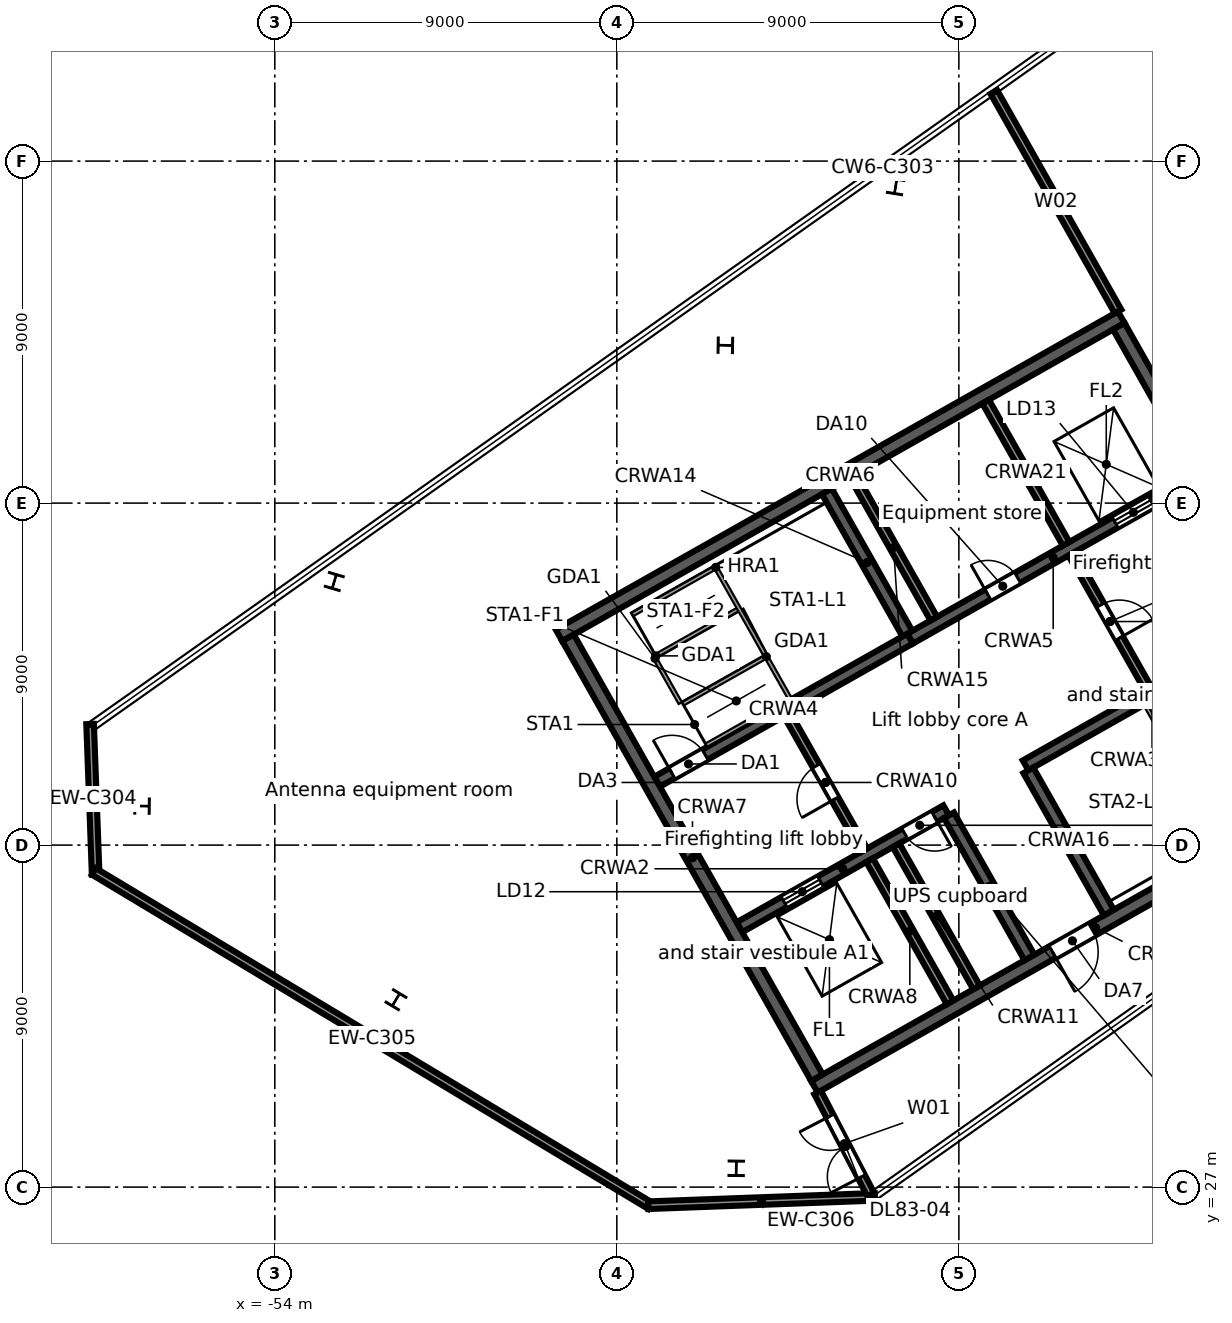
"""IFC4 building model, lengths in metres.
Left out: names, types, materials, properties, quantities, classifications, styles, units other than length and angle.
Written with IfcOpenShell. Run it as: python <this file> out.ifc"""

import sys

from ifc_helpers import new_model, si_unit, direction, frame, frame_2d, origin, origin_2d, place, context, subcontext, project, spatial, rectangle, i_section, extrude, element, fill, save


model = new_model("IFC4")
c1 = context("Model", 3, precision=1e-05, world=origin(), true_north=direction((0.0, 1.0)))
c2 = subcontext(c1, "Body", "Model", "MODEL_VIEW")
j1 = project(units=[si_unit("LENGTHUNIT", "METRE"), si_unit("PLANEANGLEUNIT", "RADIAN")], contexts=[c1])
p1 = place(None, origin())
s1 = spatial("IfcSite", under=j1, at=p1, CompositionType="ELEMENT")
p2 = place(p1, origin())
s2 = spatial("IfcBuilding", under=s1, at=p2, CompositionType="ELEMENT")
p3 = place(p2, frame((0.0, 0.0, 364.9)))
s3 = spatial("IfcBuildingStorey", under=s2, at=p3, CompositionType="ELEMENT", Elevation=364.9)
for number, where, z_axis, x_axis in (
    (1, (-57.493, 37.027, 0.0), (0.0, 0.0, 1.0), (-0.013, -1.0, 0.0)),
    (2, (-50.812, 31.931, 0.0), (0.0, 0.0, 1.0), (0.857, -0.515, 0.0)),
    (3, (-41.858, 27.495, 0.0), (0.0, 0.0, 1.0), (1.0, -0.013, 0.0)),
    (4, (-42.144, 49.153, 0.0), (0.0, 0.0, 1.0), (0.018, 1.0, 0.0)),
    (5, (-37.664, 53.334, 0.0), (0.0, 0.0, 1.0), (-0.987, 0.158, 0.0)),
    (6, (-52.435, 42.936, 0.0), (0.0, 0.0, 1.0), (-0.959, 0.283, 0.0)),
):
    element("IfcColumn", number, at=place(p3, frame(where, z_axis=z_axis, x_axis=x_axis)), inside=s3, PredefinedType="COLUMN", context=c2, shape_type="SweptSolid", body=[
        extrude(i_section(OverallWidth=0.4, OverallDepth=0.4, WebThickness=0.013, FlangeThickness=0.021, FilletRadius=0.022, at=origin_2d()), origin(), (0.0, 0.0, 1.0), 3.6),
    ])
p4 = place(p3, frame((-58.714, 35.226, 0.0), z_axis=(0.0, 0.0, 1.0), x_axis=(-0.036847570404, 0.999320897688, 0.0)))
e7 = element("IfcWall", 7, at=p4, inside=s3, PredefinedType="STANDARD", context=c2, shape_type="SweptSolid", body=[
    extrude(rectangle(XDim=3.962, YDim=0.2, at=frame_2d((1.981, 0.0))), origin(), (0.0, 0.0, 1.0), 3.3),
])
p5 = place(p3, frame((-44.119, 26.509, 0.0), z_axis=(0.0, 0.0, 1.0), x_axis=(-0.857168693653, 0.515035756644, 0.0)))
e8 = element("IfcWall", 8, at=p5, inside=s3, PredefinedType="STANDARD", context=c2, shape_type="SweptSolid", body=[
    extrude(rectangle(XDim=17.084, YDim=0.2, at=frame_2d((8.542, 0.0))), origin(), (0.0, 0.0, 1.0), 3.3),
])
p6 = place(p3, frame((-38.21, 26.744, 0.0), z_axis=(0.0, 0.0, 1.0), x_axis=(-0.999319030106, -0.036898185155, 0.0)))
e9 = element("IfcWall", 9, at=p6, inside=s3, PredefinedType="STANDARD", context=c2, shape_type="SweptSolid", body=[
    extrude(rectangle(XDim=5.968, YDim=0.2, at=frame_2d((2.984, 0.0))), origin(), (0.0, 0.0, 1.0), 3.3),
])
p7 = place(p3, frame((-39.801, 29.64, 0.0), z_axis=(0.0, 0.0, 1.0), x_axis=(0.870359753402, 0.492416388494, 0.0)))
e10 = element("IfcWall", 10, at=p7, inside=s3, PredefinedType="SOLIDWALL", context=c2, shape_type="SweptSolid", body=[
    extrude(rectangle(XDim=17.0, YDim=0.35, at=frame_2d((8.5, 0.0))), origin(), (0.0, 0.0, 1.0), 3.3),
])
p8 = place(p7, frame((7.2, 0.0, 0.0)))
e11 = element("IfcOpeningElement", 11, at=p8, cuts=e10, PredefinedType="OPENING", context=c2, shape_type="SweptSolid", body=[
    extrude(rectangle(XDim=1.2, YDim=2.1, at=frame_2d((0.6, 1.05))), frame((0.0, 0.185, 0.0), z_axis=(0.0, -1.0, 0.0), x_axis=(1.0, 0.0, 0.0)), (0.0, 0.0, 1.0), 0.37),
])
p9 = place(p3, frame((-41.774, 33.838, 0.0), z_axis=(0.0, 0.0, 1.0), x_axis=(0.870355415866, 0.492424055132, 0.0)))
e12 = element("IfcWall", 12, at=p9, inside=s3, PredefinedType="SOLIDWALL", context=c2, shape_type="SweptSolid", body=[
    extrude(rectangle(XDim=6.25, YDim=0.3, at=frame_2d((3.125, 0.0))), origin(), (0.0, 0.0, 1.0), 3.3),
])
p10 = place(p9, frame((1.35, 0.0, 0.0)))
e13 = element("IfcOpeningElement", 13, at=p10, cuts=e12, PredefinedType="OPENING", context=c2, shape_type="SweptSolid", body=[
    extrude(rectangle(XDim=1.1, YDim=2.1, at=frame_2d((0.55, 1.05))), frame((0.0, 0.16, 0.0), z_axis=(0.0, -1.0, 0.0), x_axis=(1.0, 0.0, 0.0)), (0.0, 0.0, 1.0), 0.32),
])
p11 = place(p9, frame((5.0, 0.0, 0.0)))
e14 = element("IfcOpeningElement", 14, at=p11, cuts=e12, PredefinedType="OPENING", context=c2, shape_type="SweptSolid", body=[
    extrude(rectangle(XDim=0.9, YDim=2.1, at=frame_2d((0.45, 1.05))), frame((0.0, 0.16, 0.0), z_axis=(0.0, -1.0, 0.0), x_axis=(1.0, 0.0, 0.0)), (0.0, 0.0, 1.0), 0.32),
])
p12 = place(p3, frame((-34.245, 38.097, 0.0), z_axis=(0.0, 0.0, 1.0), x_axis=(0.870352347706, 0.49242947804, 0.0)))
e15 = element("IfcWall", 15, at=p12, inside=s3, PredefinedType="SOLIDWALL", context=c2, shape_type="SweptSolid", body=[
    extrude(rectangle(XDim=7.65, YDim=0.3, at=frame_2d((3.825, 0.0))), origin(), (0.0, 0.0, 1.0), 3.3),
])
p13 = place(p12, frame((6.2, 0.0, 0.0)))
e16 = element("IfcOpeningElement", 16, at=p13, cuts=e15, PredefinedType="OPENING", context=c2, shape_type="SweptSolid", body=[
    extrude(rectangle(XDim=1.0, YDim=2.1, at=frame_2d((0.5, 1.05))), frame((0.0, 0.16, 0.0), z_axis=(0.0, -1.0, 0.0), x_axis=(1.0, 0.0, 0.0)), (0.0, 0.0, 1.0), 0.32),
])
p14 = place(p3, frame((-43.94, 37.667, 0.0), z_axis=(0.0, 0.0, 1.0), x_axis=(0.870352347706, 0.49242947804, 0.0)))
e17 = element("IfcWall", 17, at=p14, inside=s3, PredefinedType="SOLIDWALL", context=c2, shape_type="SweptSolid", body=[
    extrude(rectangle(XDim=7.65, YDim=0.3, at=frame_2d((3.825, 0.0))), origin(), (0.0, 0.0, 1.0), 3.3),
])
p15 = place(p14, frame((0.45, 0.0, 0.0)))
e18 = element("IfcOpeningElement", 18, at=p15, cuts=e17, PredefinedType="OPENING", context=c2, shape_type="SweptSolid", body=[
    extrude(rectangle(XDim=1.0, YDim=2.1, at=frame_2d((0.5, 1.05))), frame((0.0, 0.16, 0.0), z_axis=(0.0, -1.0, 0.0), x_axis=(1.0, 0.0, 0.0)), (0.0, 0.0, 1.0), 0.32),
])
p16 = place(p3, frame((-37.282, 41.435, 0.0), z_axis=(0.0, 0.0, 1.0), x_axis=(0.870364588774, 0.492407841741, 0.0)))
e19 = element("IfcWall", 19, at=p16, inside=s3, PredefinedType="SOLIDWALL", context=c2, shape_type="SweptSolid", body=[
    extrude(rectangle(XDim=8.65, YDim=0.3, at=frame_2d((4.325, 0.0))), origin(), (0.0, 0.0, 1.0), 3.3),
])
p17 = place(p16, frame((6.2, 0.0, 0.0)))
e20 = element("IfcOpeningElement", 20, at=p17, cuts=e19, PredefinedType="OPENING", context=c2, shape_type="SweptSolid", body=[
    extrude(rectangle(XDim=1.1, YDim=2.1, at=frame_2d((0.55, 1.05))), frame((0.0, 0.16, 0.0), z_axis=(0.0, -1.0, 0.0), x_axis=(1.0, 0.0, 0.0)), (0.0, 0.0, 1.0), 0.32),
])
p18 = place(p16, frame((2.35, 0.0, 0.0)))
e21 = element("IfcOpeningElement", 21, at=p18, cuts=e19, PredefinedType="OPENING", context=c2, shape_type="SweptSolid", body=[
    extrude(rectangle(XDim=0.9, YDim=2.1, at=frame_2d((0.45, 1.05))), frame((0.0, 0.16, 0.0), z_axis=(0.0, -1.0, 0.0), x_axis=(1.0, 0.0, 0.0)), (0.0, 0.0, 1.0), 0.32),
])
p19 = place(p3, frame((-46.522, 41.521, 0.0), z_axis=(0.0, 0.0, 1.0), x_axis=(0.870359753402, 0.492416388494, 0.0)))
e22 = element("IfcWall", 22, at=p19, inside=s3, PredefinedType="SOLIDWALL", context=c2, shape_type="SweptSolid", body=[
    extrude(rectangle(XDim=17.0, YDim=0.35, at=frame_2d((8.5, 0.0))), origin(), (0.0, 0.0, 1.0), 3.3),
])
p20 = place(p3, frame((-46.284, 41.454, 0.0), z_axis=(0.0, 0.0, 1.0), x_axis=(0.492429810477, -0.870352159619, 0.0)))
e23 = element("IfcWall", 23, at=p20, inside=s3, PredefinedType="SOLIDWALL", context=c2, shape_type="SweptSolid", body=[
    extrude(rectangle(XDim=13.3, YDim=0.35, at=frame_2d((6.65, 0.0))), origin(), (0.0, 0.0, 1.0), 3.3),
])
p21 = place(p3, frame((-38.349, 35.603, 0.0), z_axis=(0.0, 0.0, 1.0), x_axis=(0.492410799949, -0.870362915164, 0.0)))
e24 = element("IfcWall", 24, at=p21, inside=s3, PredefinedType="SOLIDWALL", context=c2, shape_type="SweptSolid", body=[
    extrude(rectangle(XDim=4.3, YDim=0.2, at=frame_2d((2.15, 0.0))), origin(), (0.0, 0.0, 1.0), 3.3),
])
p22 = place(p3, frame((-40.516, 39.433, 0.0), z_axis=(0.0, 0.0, 1.0), x_axis=(0.492453559952, -0.87033872216, 0.0)))
e25 = element("IfcWall", 25, at=p22, inside=s3, PredefinedType="PARTITIONING", context=c2, shape_type="SweptSolid", body=[
    extrude(rectangle(XDim=4.1, YDim=0.2, at=frame_2d((2.05, 0.0))), origin(), (0.0, 0.0, 1.0), 3.3),
])
p23 = place(p22, frame((1.55, 0.0, 0.0)))
e26 = element("IfcOpeningElement", 26, at=p23, cuts=e25, PredefinedType="OPENING", context=c2, shape_type="SweptSolid", body=[
    extrude(rectangle(XDim=1.0, YDim=2.1, at=frame_2d((0.5, 1.05))), frame((0.0, 0.11, 0.0), z_axis=(0.0, -1.0, 0.0), x_axis=(1.0, 0.0, 0.0)), (0.0, 0.0, 1.0), 0.22),
])
p24 = place(p3, frame((-37.653, 35.997, 0.0), z_axis=(0.0, 0.0, 1.0), x_axis=(0.492435133428, -0.870349147967, 0.0)))
e27 = element("IfcWall", 27, at=p24, inside=s3, PredefinedType="SOLIDWALL", context=c2, shape_type="SweptSolid", body=[
    extrude(rectangle(XDim=4.3, YDim=0.2, at=frame_2d((2.15, 0.0))), origin(), (0.0, 0.0, 1.0), 3.3),
])
p25 = place(p3, frame((-36.26, 36.785, 0.0), z_axis=(0.0, 0.0, 1.0), x_axis=(0.492435133428, -0.870349147967, 0.0)))
e28 = element("IfcWall", 28, at=p25, inside=s3, PredefinedType="SOLIDWALL", context=c2, shape_type="SweptSolid", body=[
    extrude(rectangle(XDim=4.3, YDim=0.3, at=frame_2d((2.15, 0.0))), origin(), (0.0, 0.0, 1.0), 3.3),
])
p26 = place(p3, frame((-39.473, 45.308, 0.0), z_axis=(0.0, 0.0, 1.0), x_axis=(0.492410799949, -0.870362915164, 0.0)))
e29 = element("IfcWall", 29, at=p26, inside=s3, PredefinedType="SOLIDWALL", context=c2, shape_type="SweptSolid", body=[
    extrude(rectangle(XDim=4.3, YDim=0.3, at=frame_2d((2.15, 0.0))), origin(), (0.0, 0.0, 1.0), 3.3),
])
p27 = place(p3, frame((-38.777, 45.701, 0.0), z_axis=(0.0, 0.0, 1.0), x_axis=(0.492435133428, -0.870349147967, 0.0)))
e30 = element("IfcWall", 30, at=p27, inside=s3, PredefinedType="SOLIDWALL", context=c2, shape_type="SweptSolid", body=[
    extrude(rectangle(XDim=4.3, YDim=0.2, at=frame_2d((2.15, 0.0))), origin(), (0.0, 0.0, 1.0), 3.3),
])
p28 = place(p3, frame((-34.171, 37.967, 0.0), z_axis=(0.0, 0.0, 1.0), x_axis=(0.492435133428, -0.870349147967, 0.0)))
e31 = element("IfcWall", 31, at=p28, inside=s3, PredefinedType="SOLIDWALL", context=c2, shape_type="SweptSolid", body=[
    extrude(rectangle(XDim=4.3, YDim=0.3, at=frame_2d((2.15, 0.0))), origin(), (0.0, 0.0, 1.0), 3.3),
])
p29 = place(p3, frame((-33.031, 43.667, 0.0), z_axis=(0.0, 0.0, 1.0), x_axis=(0.492408451753, -0.87036424366, 0.0)))
e32 = element("IfcWall", 32, at=p29, inside=s3, PredefinedType="PARTITIONING", context=c2, shape_type="SweptSolid", body=[
    extrude(rectangle(XDim=4.1, YDim=0.2, at=frame_2d((2.05, 0.0))), origin(), (0.0, 0.0, 1.0), 3.3),
])
p30 = place(p29, frame((1.55, 0.0, 0.0)))
e33 = element("IfcOpeningElement", 33, at=p30, cuts=e32, PredefinedType="OPENING", context=c2, shape_type="SweptSolid", body=[
    extrude(rectangle(XDim=1.0, YDim=2.1, at=frame_2d((0.5, 1.05))), frame((0.0, 0.11, 0.0), z_axis=(0.0, -1.0, 0.0), x_axis=(1.0, 0.0, 0.0)), (0.0, 0.0, 1.0), 0.22),
])
p31 = place(p3, frame((-35.296, 47.671, 0.0), z_axis=(0.0, 0.0, 1.0), x_axis=(0.492435133428, -0.870349147967, 0.0)))
e34 = element("IfcWall", 34, at=p31, inside=s3, PredefinedType="SOLIDWALL", context=c2, shape_type="SweptSolid", body=[
    extrude(rectangle(XDim=4.3, YDim=0.2, at=frame_2d((2.15, 0.0))), origin(), (0.0, 0.0, 1.0), 3.3),
])
p32 = place(p3, frame((-31.792, 49.653, 0.0), z_axis=(0.0, 0.0, 1.0), x_axis=(0.492421943245, -0.870356610712, 0.0)))
e35 = element("IfcWall", 35, at=p32, inside=s3, PredefinedType="SOLIDWALL", context=c2, shape_type="SweptSolid", body=[
    extrude(rectangle(XDim=13.3, YDim=0.35, at=frame_2d((6.65, 0.0))), origin(), (0.0, 0.0, 1.0), 3.3),
])
p33 = place(p3, frame((-39.715, 29.488, 0.0), z_axis=(0.0, 0.0, 1.0), x_axis=(0.461720517785, -0.887025458178, 0.0)))
e36 = element("IfcWall", 36, at=p33, inside=s3, PredefinedType="PARTITIONING", context=c2, shape_type="SweptSolid", body=[
    extrude(rectangle(XDim=3.03, YDim=0.2, at=frame_2d((1.515, 0.0))), origin(), (0.0, 0.0, 1.0), 3.3),
])
p34 = place(p33, frame((0.7, 0.0, 0.0)))
e37 = element("IfcOpeningElement", 37, at=p34, cuts=e36, PredefinedType="OPENING", context=c2, shape_type="SweptSolid", body=[
    extrude(rectangle(XDim=1.8, YDim=2.1, at=frame_2d((0.9, 1.05))), frame((0.0, 0.11, 0.0), z_axis=(0.0, -1.0, 0.0), x_axis=(1.0, 0.0, 0.0)), (0.0, 0.0, 1.0), 0.22),
])
p35 = place(p3, frame((-35.08, 55.819, 0.0), z_axis=(0.0, 0.0, 1.0), x_axis=(0.49249727422, -0.870313986379, 0.0)))
e38 = element("IfcWall", 38, at=p35, inside=s3, PredefinedType="PARTITIONING", context=c2, shape_type="SweptSolid", body=[
    extrude(rectangle(XDim=6.636, YDim=0.2, at=frame_2d((3.318, 0.0))), origin(), (0.0, 0.0, 1.0), 2.68),
])
p36 = place(p3, frame((-31.031, 58.679, 0.0), z_axis=(0.0, 0.0, 1.0), x_axis=(0.495492853456, -0.868612014753, 0.0)))
e39 = element("IfcWall", 39, at=p36, inside=s3, PredefinedType="PARTITIONING", context=c2, shape_type="SweptSolid", body=[
    extrude(rectangle(XDim=19.13, YDim=0.2, at=frame_2d((9.565, 0.0))), origin(), (0.0, 0.0, 1.0), 2.68),
])
p37 = place(p17, origin())
e40 = element("IfcDoor", 40, at=p37, inside=s3, OperationType="DOUBLE_DOOR_SLIDING", PredefinedType="DOOR", context=c2, shape_type="SweptSolid", body=[
    extrude(rectangle(XDim=1.1, YDim=2.1, at=frame_2d((0.55, 1.05))), frame((0.0, 0.025, 0.0), z_axis=(0.0, -1.0, 0.0), x_axis=(1.0, 0.0, 0.0)), (0.0, 0.0, 1.0), 0.05),
])
fill(e20, e40)
p38 = place(p10, origin())
e41 = element("IfcDoor", 41, at=p38, inside=s3, OperationType="DOUBLE_DOOR_SLIDING", PredefinedType="DOOR", context=c2, shape_type="SweptSolid", body=[
    extrude(rectangle(XDim=1.1, YDim=2.1, at=frame_2d((0.55, 1.05))), frame((0.0, 0.025, 0.0), z_axis=(0.0, -1.0, 0.0), x_axis=(1.0, 0.0, 0.0)), (0.0, 0.0, 1.0), 0.05),
])
fill(e13, e41)
p39 = place(p15, origin())
e42 = element("IfcDoor", 42, at=p39, inside=s3, OperationType="SINGLE_SWING_LEFT", PredefinedType="DOOR", context=c2, shape_type="SweptSolid", body=[
    extrude(rectangle(XDim=1.0, YDim=2.1, at=frame_2d((0.5, 1.05))), frame((0.0, 0.025, 0.0), z_axis=(0.0, -1.0, 0.0), x_axis=(1.0, 0.0, 0.0)), (0.0, 0.0, 1.0), 0.05),
])
fill(e18, e42)
p40 = place(p23, frame((1.0, 0.0, 0.0), z_axis=(0.0, 0.0, 1.0), x_axis=(-1.0, 0.0, 0.0)))
e43 = element("IfcDoor", 43, at=p40, inside=s3, OperationType="SINGLE_SWING_LEFT", PredefinedType="DOOR", context=c2, shape_type="SweptSolid", body=[
    extrude(rectangle(XDim=1.0, YDim=2.1, at=frame_2d((0.5, 1.05))), frame((0.0, 0.025, 0.0), z_axis=(0.0, -1.0, 0.0), x_axis=(1.0, 0.0, 0.0)), (0.0, 0.0, 1.0), 0.05),
])
fill(e26, e43)
p41 = place(p30, origin())
e44 = element("IfcDoor", 44, at=p41, inside=s3, OperationType="SINGLE_SWING_RIGHT", PredefinedType="DOOR", context=c2, shape_type="SweptSolid", body=[
    extrude(rectangle(XDim=1.0, YDim=2.1, at=frame_2d((0.5, 1.05))), frame((0.0, 0.025, 0.0), z_axis=(0.0, -1.0, 0.0), x_axis=(1.0, 0.0, 0.0)), (0.0, 0.0, 1.0), 0.05),
])
fill(e33, e44)
p42 = place(p8, frame((1.2, 0.0, 0.0), z_axis=(0.0, 0.0, 1.0), x_axis=(-1.0, 0.0, 0.0)))
e45 = element("IfcDoor", 45, at=p42, inside=s3, OperationType="SINGLE_SWING_RIGHT", PredefinedType="DOOR", context=c2, shape_type="SweptSolid", body=[
    extrude(rectangle(XDim=1.2, YDim=2.1, at=frame_2d((0.6, 1.05))), frame((0.0, 0.025, 0.0), z_axis=(0.0, -1.0, 0.0), x_axis=(1.0, 0.0, 0.0)), (0.0, 0.0, 1.0), 0.05),
])
fill(e11, e45)
p43 = place(p18, origin())
e46 = element("IfcDoor", 46, at=p43, inside=s3, OperationType="SINGLE_SWING_LEFT", PredefinedType="DOOR", context=c2, shape_type="SweptSolid", body=[
    extrude(rectangle(XDim=0.9, YDim=2.1, at=frame_2d((0.45, 1.05))), frame((0.0, 0.025, 0.0), z_axis=(0.0, -1.0, 0.0), x_axis=(1.0, 0.0, 0.0)), (0.0, 0.0, 1.0), 0.05),
])
fill(e21, e46)
p44 = place(p11, frame((0.9, 0.0, 0.0), z_axis=(0.0, 0.0, 1.0), x_axis=(-1.0, 0.0, 0.0)))
e47 = element("IfcDoor", 47, at=p44, inside=s3, OperationType="SINGLE_SWING_LEFT", PredefinedType="DOOR", context=c2, shape_type="SweptSolid", body=[
    extrude(rectangle(XDim=0.9, YDim=2.1, at=frame_2d((0.45, 1.05))), frame((0.0, 0.025, 0.0), z_axis=(0.0, -1.0, 0.0), x_axis=(1.0, 0.0, 0.0)), (0.0, 0.0, 1.0), 0.05),
])
fill(e14, e47)
p45 = place(p34, frame((1.8, 0.0, 0.0), z_axis=(0.0, 0.0, 1.0), x_axis=(-1.0, 0.0, 0.0)))
e48 = element("IfcDoor", 48, at=p45, inside=s3, OperationType="DOUBLE_DOOR_SINGLE_SWING", PredefinedType="DOOR", context=c2, shape_type="SweptSolid", body=[
    extrude(rectangle(XDim=1.8, YDim=2.1, at=frame_2d((0.9, 1.05))), frame((0.0, 0.025, 0.0), z_axis=(0.0, -1.0, 0.0), x_axis=(1.0, 0.0, 0.0)), (0.0, 0.0, 1.0), 0.05),
])
fill(e37, e48)
save(model, sys.argv[1])
